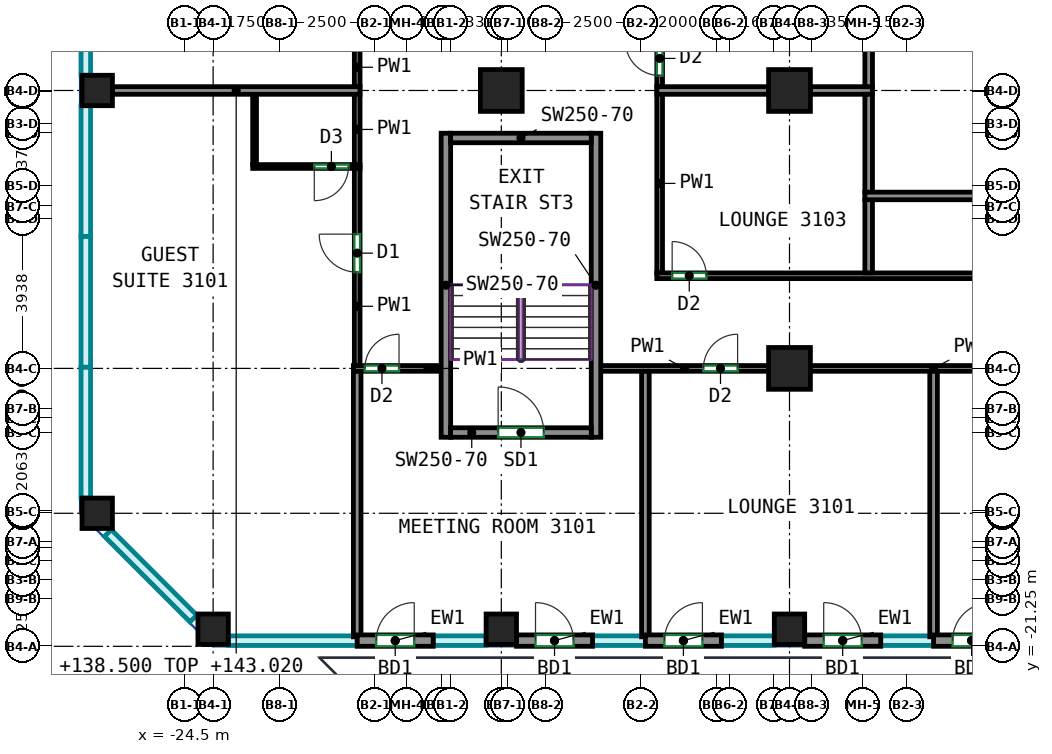
"""IFC4 building model, lengths in metres.
Left out: names, types, materials, properties, quantities, classifications, styles, units other than length and angle.
Written with IfcOpenShell. Run it as: python <this file> out.ifc"""

import sys

from ifc_helpers import new_model, si_unit, direction, frame, frame_2d, origin, origin_2d, place, context, subcontext, project, spatial, rectangle, extrude, source, transform, mapped, element, fill, save


model = new_model("IFC4")
c1 = context("Model", 3, precision=1e-05, world=origin(), true_north=direction((0.0, 1.0)))
c2 = subcontext(c1, "Body", "Model", "MODEL_VIEW")
j1 = project(units=[si_unit("LENGTHUNIT", "METRE"), si_unit("PLANEANGLEUNIT", "RADIAN")], contexts=[c1])
p1 = place(None, origin())
s1 = spatial("IfcSite", under=j1, at=p1, CompositionType="ELEMENT")
p2 = place(p1, origin())
s2 = spatial("IfcBuilding", under=s1, at=p2, CompositionType="ELEMENT")
p3 = place(p2, frame((0.0, 0.0, 138.5)))
s3 = spatial("IfcBuildingStorey", under=s2, at=p3, CompositionType="ELEMENT", Elevation=138.5)
m1 = source(origin(), c2, "Body", "SweptSolid", [
    extrude(rectangle(XDim=0.8, YDim=0.8, at=origin_2d()), origin(), (0.0, 0.0, 1.0), 5.12),
])
for number, where, z_axis, x_axis in (
    (1, (-26.8, -17.75, 0.0), (0.0, 0.0, 1.0), (1.0, 0.0, 0.0)),
    (2, (-26.8, -6.625, 0.0), (0.0, 0.0, 1.0), (1.0, 0.0, 0.0)),
    (3, (-23.75, -20.8, 0.0), (0.0, 0.0, 1.0), (1.0, 0.0, 0.0)),
    (4, (-16.167, -20.8, 0.0), (0.0, 0.0, 1.0), (1.0, 0.0, 0.0)),
):
    element("IfcColumn", number, at=place(p3, frame(where, z_axis=z_axis, x_axis=x_axis)), inside=s3, PredefinedType="COLUMN", context=c2, shape_type="MappedRepresentation", body=[
        mapped(m1, transform((0.0, 0.0, 0.0))),
    ])
m2 = source(origin(), c2, "Body", "SweptSolid", [
    extrude(rectangle(XDim=1.1, YDim=1.1, at=origin_2d()), origin(), (0.0, 0.0, 1.0), 5.12),
])
p4 = place(p3, frame((-16.167, -6.625, 0.0), z_axis=(0.0, 0.0, 1.0), x_axis=(1.0, 0.0, 0.0)))
e5 = element("IfcColumn", 5, at=p4, inside=s3, PredefinedType="COLUMN", context=c2, shape_type="MappedRepresentation", body=[
    mapped(m2, transform((0.0, 0.0, 0.0))),
])
p5 = place(p3, frame((-8.583, -20.8, 0.0), z_axis=(0.0, 0.0, 1.0), x_axis=(1.0, 0.0, 0.0)))
e6 = element("IfcColumn", 6, at=p5, inside=s3, PredefinedType="COLUMN", context=c2, shape_type="MappedRepresentation", body=[
    mapped(m1, transform((0.0, 0.0, 0.0))),
])
for number, where, z_axis, x_axis in (
    (7, (-8.583, -13.938, 0.0), (0.0, 0.0, 1.0), (1.0, 0.0, 0.0)),
    (8, (-8.583, -6.625, 0.0), (0.0, 0.0, 1.0), (1.0, 0.0, 0.0)),
):
    element("IfcColumn", number, at=place(p3, frame(where, z_axis=z_axis, x_axis=x_axis)), inside=s3, PredefinedType="COLUMN", context=c2, shape_type="MappedRepresentation", body=[
        mapped(m2, transform((0.0, 0.0, 0.0))),
    ])
m3 = source(origin(), c2, "Body", "SweptSolid", [
    extrude(rectangle(XDim=8.0, YDim=0.25, at=frame_2d((4.0, 0.0))), origin(), (0.0, 0.0, 1.0), 5.12),
])
for number, where, z_axis, x_axis in (
    (9, (-17.625, -15.75, 0.0), (0.0, 0.0, 1.0), (0.0, 1.0, 0.0)),
    (10, (-13.675, -15.75, 0.0), (0.0, 0.0, 1.0), (0.0, 1.0, 0.0)),
):
    element("IfcWall", number, at=place(p3, frame(where, z_axis=z_axis, x_axis=x_axis)), inside=s3, PredefinedType="SHEAR", context=c2, shape_type="MappedRepresentation", body=[
        mapped(m3, transform((0.0, 0.0, 0.0))),
    ])
m4 = source(origin(), c2, "Body", "SweptSolid", [
    extrude(rectangle(XDim=3.7, YDim=0.25, at=frame_2d((1.85, 0.0))), origin(), (0.0, 0.0, 1.0), 5.12),
])
p6 = place(p3, frame((-17.5, -15.625, 0.0), z_axis=(0.0, 0.0, 1.0), x_axis=(1.0, 0.0, 0.0)))
e11 = element("IfcWall", 11, at=p6, inside=s3, PredefinedType="SHEAR", context=c2, shape_type="MappedRepresentation", body=[
    mapped(m4, transform((0.0, 0.0, 0.0))),
])
p7 = place(p6, frame((1.25, 0.0, 0.0)))
e12 = element("IfcOpeningElement", 12, at=p7, cuts=e11, PredefinedType="OPENING", context=c2, shape_type="SweptSolid", body=[
    extrude(rectangle(XDim=1.2, YDim=2.1, at=frame_2d((0.6, 1.05))), frame((0.0, 0.135, 0.0), z_axis=(0.0, -1.0, 0.0), x_axis=(1.0, 0.0, 0.0)), (0.0, 0.0, 1.0), 0.27),
])
p8 = place(p3, frame((-17.5, -7.875, 0.0), z_axis=(0.0, 0.0, 1.0), x_axis=(1.0, 0.0, 0.0)))
e13 = element("IfcWall", 13, at=p8, inside=s3, PredefinedType="SHEAR", context=c2, shape_type="MappedRepresentation", body=[
    mapped(m4, transform((0.0, 0.0, 0.0))),
])
m5 = source(origin(), c2, "Body", "SweptSolid", [
    extrude(rectangle(XDim=2.0, YDim=0.3, at=frame_2d((1.0, 0.0))), origin(), (0.0, 0.0, 1.0), 5.12),
])
p9 = place(p3, frame((-19.958, -21.1, 0.0), z_axis=(0.0, 0.0, 1.0), x_axis=(1.0, 0.0, 0.0)))
e14 = element("IfcWall", 14, at=p9, inside=s3, PredefinedType="SOLIDWALL", context=c2, shape_type="MappedRepresentation", body=[
    mapped(m5, transform((0.0, 0.0, 0.0))),
])
p10 = place(p9, frame((0.5, 0.0, 0.0)))
e15 = element("IfcOpeningElement", 15, at=p10, cuts=e14, PredefinedType="OPENING", context=c2, shape_type="SweptSolid", body=[
    extrude(rectangle(XDim=1.0, YDim=2.1, at=frame_2d((0.5, 1.05))), frame((0.0, 0.16, 0.0), z_axis=(0.0, -1.0, 0.0), x_axis=(1.0, 0.0, 0.0)), (0.0, 0.0, 1.0), 0.32),
])
p11 = place(p3, frame((-15.767, -21.1, 0.0), z_axis=(0.0, 0.0, 1.0), x_axis=(1.0, 0.0, 0.0)))
e16 = element("IfcWall", 16, at=p11, inside=s3, PredefinedType="SOLIDWALL", context=c2, shape_type="MappedRepresentation", body=[
    mapped(m5, transform((0.0, 0.0, 0.0))),
])
p12 = place(p11, frame((0.5, 0.0, 0.0)))
e17 = element("IfcOpeningElement", 17, at=p12, cuts=e16, PredefinedType="OPENING", context=c2, shape_type="SweptSolid", body=[
    extrude(rectangle(XDim=1.0, YDim=2.1, at=frame_2d((0.5, 1.05))), frame((0.0, 0.16, 0.0), z_axis=(0.0, -1.0, 0.0), x_axis=(1.0, 0.0, 0.0)), (0.0, 0.0, 1.0), 0.32),
])
p13 = place(p3, frame((-12.375, -21.1, 0.0), z_axis=(0.0, 0.0, 1.0), x_axis=(1.0, 0.0, 0.0)))
e18 = element("IfcWall", 18, at=p13, inside=s3, PredefinedType="SOLIDWALL", context=c2, shape_type="MappedRepresentation", body=[
    mapped(m5, transform((0.0, 0.0, 0.0))),
])
p14 = place(p13, frame((0.5, 0.0, 0.0)))
e19 = element("IfcOpeningElement", 19, at=p14, cuts=e18, PredefinedType="OPENING", context=c2, shape_type="SweptSolid", body=[
    extrude(rectangle(XDim=1.0, YDim=2.1, at=frame_2d((0.5, 1.05))), frame((0.0, 0.16, 0.0), z_axis=(0.0, -1.0, 0.0), x_axis=(1.0, 0.0, 0.0)), (0.0, 0.0, 1.0), 0.32),
])
p15 = place(p3, frame((-8.183, -21.1, 0.0), z_axis=(0.0, 0.0, 1.0), x_axis=(1.0, 0.0, 0.0)))
e20 = element("IfcWall", 20, at=p15, inside=s3, PredefinedType="SOLIDWALL", context=c2, shape_type="MappedRepresentation", body=[
    mapped(m5, transform((0.0, 0.0, 0.0))),
])
p16 = place(p15, frame((0.5, 0.0, 0.0)))
e21 = element("IfcOpeningElement", 21, at=p16, cuts=e20, PredefinedType="OPENING", context=c2, shape_type="SweptSolid", body=[
    extrude(rectangle(XDim=1.0, YDim=2.1, at=frame_2d((0.5, 1.05))), frame((0.0, 0.16, 0.0), z_axis=(0.0, -1.0, 0.0), x_axis=(1.0, 0.0, 0.0)), (0.0, 0.0, 1.0), 0.32),
])
p17 = place(p3, frame((-4.792, -21.1, 0.0), z_axis=(0.0, 0.0, 1.0), x_axis=(1.0, 0.0, 0.0)))
e22 = element("IfcWall", 22, at=p17, inside=s3, PredefinedType="SOLIDWALL", context=c2, shape_type="MappedRepresentation", body=[
    mapped(m5, transform((0.0, 0.0, 0.0))),
])
p18 = place(p17, frame((0.5, 0.0, 0.0)))
e23 = element("IfcOpeningElement", 23, at=p18, cuts=e22, PredefinedType="OPENING", context=c2, shape_type="SweptSolid", body=[
    extrude(rectangle(XDim=1.0, YDim=2.1, at=frame_2d((0.5, 1.05))), frame((0.0, 0.16, 0.0), z_axis=(0.0, -1.0, 0.0), x_axis=(1.0, 0.0, 0.0)), (0.0, 0.0, 1.0), 0.32),
])
p19 = place(p3, frame((-13.55, -13.938, 0.0), z_axis=(0.0, 0.0, 1.0), x_axis=(1.0, 0.0, 0.0)))
e24 = element("IfcWall", 24, at=p19, inside=s3, PredefinedType="PARTITIONING", context=c2, shape_type="SweptSolid", body=[
    extrude(rectangle(XDim=4.417, YDim=0.15, at=frame_2d((2.208, 0.0))), origin(), (0.0, 0.0, 1.0), 5.12),
])
p20 = place(p19, frame((2.701, 0.0, 0.0)))
e25 = element("IfcOpeningElement", 25, at=p20, cuts=e24, PredefinedType="OPENING", context=c2, shape_type="SweptSolid", body=[
    extrude(rectangle(XDim=0.9, YDim=2.1, at=frame_2d((0.45, 1.05))), frame((0.0, 0.085, 0.0), z_axis=(0.0, -1.0, 0.0), x_axis=(1.0, 0.0, 0.0)), (0.0, 0.0, 1.0), 0.17),
])
p21 = place(p3, frame((-20.059, -13.938, 0.0), z_axis=(0.0, 0.0, 1.0), x_axis=(1.0, 0.0, 0.0)))
e26 = element("IfcWall", 26, at=p21, inside=s3, PredefinedType="PARTITIONING", context=c2, shape_type="SweptSolid", body=[
    extrude(rectangle(XDim=2.309, YDim=0.15, at=frame_2d((1.155, 0.0))), origin(), (0.0, 0.0, 1.0), 5.12),
])
p22 = place(p21, frame((0.301, 0.0, 0.0)))
e27 = element("IfcOpeningElement", 27, at=p22, cuts=e26, PredefinedType="OPENING", context=c2, shape_type="SweptSolid", body=[
    extrude(rectangle(XDim=0.9, YDim=2.1, at=frame_2d((0.45, 1.05))), frame((0.0, 0.085, 0.0), z_axis=(0.0, -1.0, 0.0), x_axis=(1.0, 0.0, 0.0)), (0.0, 0.0, 1.0), 0.17),
])
p23 = place(p3, frame((-8.033, -13.938, 0.0), z_axis=(0.0, 0.0, 1.0), x_axis=(1.0, 0.0, 0.0)))
e28 = element("IfcWall", 28, at=p23, inside=s3, PredefinedType="PARTITIONING", context=c2, shape_type="SweptSolid", body=[
    extrude(rectangle(XDim=6.483, YDim=0.15, at=frame_2d((3.241, 0.0))), origin(), (0.0, 0.0, 1.0), 5.12),
])
p24 = place(p3, frame((-19.959, -13.863, 0.0), z_axis=(0.0, 0.0, 1.0), x_axis=(0.0, 1.0, 0.0)))
e29 = element("IfcWall", 29, at=p24, inside=s3, PredefinedType="PARTITIONING", context=c2, shape_type="SweptSolid", body=[
    extrude(rectangle(XDim=5.198, YDim=0.15, at=frame_2d((2.599, 0.0))), origin(), (0.0, 0.0, 1.0), 5.12),
])
p25 = place(p24, frame((2.458, 0.0, 0.0)))
e30 = element("IfcOpeningElement", 30, at=p25, cuts=e29, PredefinedType="OPENING", context=c2, shape_type="SweptSolid", body=[
    extrude(rectangle(XDim=1.0, YDim=2.1, at=frame_2d((0.5, 1.05))), frame((0.0, 0.085, 0.0), z_axis=(0.0, -1.0, 0.0), x_axis=(1.0, 0.0, 0.0)), (0.0, 0.0, 1.0), 0.17),
])
p26 = place(p3, frame((-19.959, -8.585, 0.0), z_axis=(0.0, 0.0, 1.0), x_axis=(0.0, 1.0, 0.0)))
e31 = element("IfcWall", 31, at=p26, inside=s3, PredefinedType="PARTITIONING", context=c2, shape_type="SweptSolid", body=[
    extrude(rectangle(XDim=1.87, YDim=0.15, at=frame_2d((0.935, 0.0))), origin(), (0.0, 0.0, 1.0), 5.12),
])
p27 = place(p3, frame((-19.959, -6.535, 0.0), z_axis=(0.0, 0.0, 1.0), x_axis=(0.0, 1.0, 0.0)))
e32 = element("IfcWall", 32, at=p27, inside=s3, PredefinedType="PARTITIONING", context=c2, shape_type="SweptSolid", body=[
    extrude(rectangle(XDim=3.476, YDim=0.15, at=frame_2d((1.738, 0.0))), origin(), (0.0, 0.0, 1.0), 5.12),
])
p28 = place(p27, frame((1.133, 0.0, 0.0)))
e33 = element("IfcOpeningElement", 33, at=p28, cuts=e32, PredefinedType="OPENING", context=c2, shape_type="SweptSolid", body=[
    extrude(rectangle(XDim=0.9, YDim=2.1, at=frame_2d((0.45, 1.05))), frame((0.0, 0.085, 0.0), z_axis=(0.0, -1.0, 0.0), x_axis=(1.0, 0.0, 0.0)), (0.0, 0.0, 1.0), 0.17),
])
p29 = place(p3, frame((-12.0, -11.425, 0.0), z_axis=(0.0, 0.0, 1.0), x_axis=(0.0, 1.0, 0.0)))
e34 = element("IfcWall", 34, at=p29, inside=s3, PredefinedType="PARTITIONING", context=c2, shape_type="SweptSolid", body=[
    extrude(rectangle(XDim=4.71, YDim=0.15, at=frame_2d((2.355, 0.0))), origin(), (0.0, 0.0, 1.0), 5.12),
])
p30 = place(p3, frame((-12.075, -11.5, 0.0), z_axis=(0.0, 0.0, 1.0), x_axis=(1.0, 0.0, 0.0)))
e35 = element("IfcWall", 35, at=p30, inside=s3, PredefinedType="PARTITIONING", context=c2, shape_type="SweptSolid", body=[
    extrude(rectangle(XDim=28.35, YDim=0.15, at=frame_2d((14.175, 0.0))), origin(), (0.0, 0.0, 1.0), 5.12),
])
p31 = place(p30, frame((0.404, 0.0, 0.0)))
e36 = element("IfcOpeningElement", 36, at=p31, cuts=e35, PredefinedType="OPENING", context=c2, shape_type="SweptSolid", body=[
    extrude(rectangle(XDim=0.9, YDim=2.1, at=frame_2d((0.45, 1.05))), frame((0.0, 0.085, 0.0), z_axis=(0.0, -1.0, 0.0), x_axis=(1.0, 0.0, 0.0)), (0.0, 0.0, 1.0), 0.17),
])
p32 = place(p30, frame((13.176, 0.0, 0.0)))
e37 = element("IfcOpeningElement", 37, at=p32, cuts=e35, PredefinedType="OPENING", context=c2, shape_type="SweptSolid", body=[
    extrude(rectangle(XDim=1.0, YDim=2.1, at=frame_2d((0.5, 1.05))), frame((0.0, 0.085, 0.0), z_axis=(0.0, -1.0, 0.0), x_axis=(1.0, 0.0, 0.0)), (0.0, 0.0, 1.0), 0.17),
])
p33 = place(p3, frame((-12.0, -6.535, 0.0), z_axis=(0.0, 0.0, 1.0), x_axis=(0.0, 1.0, 0.0)))
e38 = element("IfcWall", 38, at=p33, inside=s3, PredefinedType="PARTITIONING", context=c2, shape_type="SweptSolid", body=[
    extrude(rectangle(XDim=3.476, YDim=0.15, at=frame_2d((1.738, 0.0))), origin(), (0.0, 0.0, 1.0), 5.12),
])
p34 = place(p33, frame((0.304, 0.0, 0.0)))
e39 = element("IfcOpeningElement", 39, at=p34, cuts=e38, PredefinedType="OPENING", context=c2, shape_type="SweptSolid", body=[
    extrude(rectangle(XDim=0.9, YDim=2.1, at=frame_2d((0.45, 1.05))), frame((0.0, 0.085, 0.0), z_axis=(0.0, -1.0, 0.0), x_axis=(1.0, 0.0, 0.0)), (0.0, 0.0, 1.0), 0.17),
])
for number, where, z_axis, x_axis in (
    (40, (-12.375, -21.0, 0.0), (0.0, 0.0, 1.0), (0.0, 1.0, 0.0)),
    (41, (-19.959, -21.0, 0.0), (0.0, 0.0, 1.0), (0.0, 1.0, 0.0)),
    (42, (-4.792, -21.0, 0.0), (0.0, 0.0, 1.0), (0.0, 1.0, 0.0)),
):
    element("IfcWall", number, at=place(p3, frame(where, z_axis=z_axis, x_axis=x_axis)), inside=s3, PredefinedType="PARTITIONING", context=c2, shape_type="SweptSolid", body=[
        extrude(rectangle(XDim=6.985, YDim=0.2, at=frame_2d((3.493, 0.0))), origin(), (0.0, 0.0, 1.0), 5.12),
    ])
p35 = place(p3, frame((-22.659, -8.575, 0.0), z_axis=(0.0, 0.0, 1.0), x_axis=(0.0, 1.0, 0.0)))
e43 = element("IfcWall", 43, at=p35, inside=s3, PredefinedType="PARTITIONING", context=c2, shape_type="SweptSolid", body=[
    extrude(rectangle(XDim=1.85, YDim=0.1, at=frame_2d((0.925, 0.0))), origin(), (0.0, 0.0, 1.0), 5.12),
])
p36 = place(p3, frame((-19.886, -8.625, 0.0), z_axis=(0.0, 0.0, 1.0), x_axis=(-1.0, 0.0, 0.0)))
e44 = element("IfcWall", 44, at=p36, inside=s3, PredefinedType="PARTITIONING", context=c2, shape_type="SweptSolid", body=[
    extrude(rectangle(XDim=2.823, YDim=0.1, at=frame_2d((1.412, 0.0))), origin(), (0.0, 0.0, 1.0), 5.12),
])
p37 = place(p36, frame((0.302, 0.0, 0.0)))
e45 = element("IfcOpeningElement", 45, at=p37, cuts=e44, PredefinedType="OPENING", context=c2, shape_type="SweptSolid", body=[
    extrude(rectangle(XDim=0.9, YDim=2.1, at=frame_2d((0.45, 1.05))), frame((0.0, 0.06, 0.0), z_axis=(0.0, -1.0, 0.0), x_axis=(1.0, 0.0, 0.0)), (0.0, 0.0, 1.0), 0.12),
])
p38 = place(p3, frame((-26.4, -6.625, 0.0), z_axis=(0.0, 0.0, 1.0), x_axis=(1.0, 0.0, 0.0)))
e46 = element("IfcWall", 46, at=p38, inside=s3, PredefinedType="PARTITIONING", context=c2, shape_type="SweptSolid", body=[
    extrude(rectangle(XDim=6.514, YDim=0.2, at=frame_2d((3.257, 0.0))), origin(), (0.0, 0.0, 1.0), 4.52),
])
p39 = place(p3, frame((-12.073, -6.625, 0.0), z_axis=(0.0, 0.0, 1.0), x_axis=(1.0, 0.0, 0.0)))
e47 = element("IfcWall", 47, at=p39, inside=s3, PredefinedType="PARTITIONING", context=c2, shape_type="SweptSolid", body=[
    extrude(rectangle(XDim=2.94, YDim=0.2, at=frame_2d((1.47, 0.0))), origin(), (0.0, 0.0, 1.0), 5.12),
])
p40 = place(p3, frame((-8.033, -6.625, 0.0), z_axis=(0.0, 0.0, 1.0), x_axis=(1.0, 0.0, 0.0)))
e48 = element("IfcWall", 48, at=p40, inside=s3, PredefinedType="PARTITIONING", context=c2, shape_type="SweptSolid", body=[
    extrude(rectangle(XDim=1.633, YDim=0.2, at=frame_2d((0.816, 0.0))), origin(), (0.0, 0.0, 1.0), 5.12),
])
p41 = place(p3, frame((-6.5, -11.423, 0.0), z_axis=(0.0, 0.0, 1.0), x_axis=(0.0, 1.0, 0.0)))
e49 = element("IfcWall", 49, at=p41, inside=s3, PredefinedType="PARTITIONING", context=c2, shape_type="SweptSolid", body=[
    extrude(rectangle(XDim=1.933, YDim=0.2, at=frame_2d((0.967, 0.0))), origin(), (0.0, 0.0, 1.0), 5.12),
])
p42 = place(p3, frame((-6.5, -9.31, 0.0), z_axis=(0.0, 0.0, 1.0), x_axis=(0.0, 1.0, 0.0)))
e50 = element("IfcWall", 50, at=p42, inside=s3, PredefinedType="PARTITIONING", context=c2, shape_type="SweptSolid", body=[
    extrude(rectangle(XDim=2.585, YDim=0.2, at=frame_2d((1.292, 0.0))), origin(), (0.0, 0.0, 1.0), 5.12),
])
p43 = place(p3, frame((-6.5, -6.525, 0.0), z_axis=(0.0, 0.0, 1.0), x_axis=(0.0, 1.0, 0.0)))
e51 = element("IfcWall", 51, at=p43, inside=s3, PredefinedType="PARTITIONING", context=c2, shape_type="SweptSolid", body=[
    extrude(rectangle(XDim=3.456, YDim=0.2, at=frame_2d((1.728, 0.0))), origin(), (0.0, 0.0, 1.0), 5.12),
])
p44 = place(p3, frame((8.6, -9.4, 0.0), z_axis=(0.0, 0.0, 1.0), x_axis=(-1.0, 0.0, 0.0)))
e52 = element("IfcWall", 52, at=p44, inside=s3, PredefinedType="PARTITIONING", context=c2, shape_type="SweptSolid", body=[
    extrude(rectangle(XDim=15.2, YDim=0.2, at=frame_2d((7.6, 0.0))), origin(), (0.0, 0.0, 1.0), 5.12),
])
p45 = place(p10, origin())
e53 = element("IfcDoor", 53, at=p45, inside=s3, OperationType="SINGLE_SWING_RIGHT", PredefinedType="DOOR", context=c2, shape_type="SweptSolid", body=[
    extrude(rectangle(XDim=1.0, YDim=2.1, at=frame_2d((0.5, 1.05))), frame((0.0, 0.025, 0.0), z_axis=(0.0, -1.0, 0.0), x_axis=(1.0, 0.0, 0.0)), (0.0, 0.0, 1.0), 0.05),
])
fill(e15, e53)
p46 = place(p12, origin())
e54 = element("IfcDoor", 54, at=p46, inside=s3, OperationType="SINGLE_SWING_LEFT", PredefinedType="DOOR", context=c2, shape_type="SweptSolid", body=[
    extrude(rectangle(XDim=1.0, YDim=2.1, at=frame_2d((0.5, 1.05))), frame((0.0, 0.025, 0.0), z_axis=(0.0, -1.0, 0.0), x_axis=(1.0, 0.0, 0.0)), (0.0, 0.0, 1.0), 0.05),
])
fill(e17, e54)
p47 = place(p14, origin())
e55 = element("IfcDoor", 55, at=p47, inside=s3, OperationType="SINGLE_SWING_RIGHT", PredefinedType="DOOR", context=c2, shape_type="SweptSolid", body=[
    extrude(rectangle(XDim=1.0, YDim=2.1, at=frame_2d((0.5, 1.05))), frame((0.0, 0.025, 0.0), z_axis=(0.0, -1.0, 0.0), x_axis=(1.0, 0.0, 0.0)), (0.0, 0.0, 1.0), 0.05),
])
fill(e19, e55)
p48 = place(p16, origin())
e56 = element("IfcDoor", 56, at=p48, inside=s3, OperationType="SINGLE_SWING_LEFT", PredefinedType="DOOR", context=c2, shape_type="SweptSolid", body=[
    extrude(rectangle(XDim=1.0, YDim=2.1, at=frame_2d((0.5, 1.05))), frame((0.0, 0.025, 0.0), z_axis=(0.0, -1.0, 0.0), x_axis=(1.0, 0.0, 0.0)), (0.0, 0.0, 1.0), 0.05),
])
fill(e21, e56)
p49 = place(p18, origin())
e57 = element("IfcDoor", 57, at=p49, inside=s3, OperationType="SINGLE_SWING_RIGHT", PredefinedType="DOOR", context=c2, shape_type="SweptSolid", body=[
    extrude(rectangle(XDim=1.0, YDim=2.1, at=frame_2d((0.5, 1.05))), frame((0.0, 0.025, 0.0), z_axis=(0.0, -1.0, 0.0), x_axis=(1.0, 0.0, 0.0)), (0.0, 0.0, 1.0), 0.05),
])
fill(e23, e57)
p50 = place(p7, origin())
e58 = element("IfcDoor", 58, at=p50, inside=s3, OperationType="DOUBLE_DOOR_SINGLE_SWING", PredefinedType="DOOR", context=c2, shape_type="SweptSolid", body=[
    extrude(rectangle(XDim=1.2, YDim=2.1, at=frame_2d((0.6, 1.05))), frame((0.0, 0.025, 0.0), z_axis=(0.0, -1.0, 0.0), x_axis=(1.0, 0.0, 0.0)), (0.0, 0.0, 1.0), 0.05),
])
fill(e12, e58)
p51 = place(p22, origin())
e59 = element("IfcDoor", 59, at=p51, inside=s3, OperationType="SINGLE_SWING_RIGHT", PredefinedType="DOOR", context=c2, shape_type="SweptSolid", body=[
    extrude(rectangle(XDim=0.9, YDim=2.1, at=frame_2d((0.45, 1.05))), frame((0.0, 0.025, 0.0), z_axis=(0.0, -1.0, 0.0), x_axis=(1.0, 0.0, 0.0)), (0.0, 0.0, 1.0), 0.05),
])
fill(e27, e59)
p52 = place(p20, origin())
e60 = element("IfcDoor", 60, at=p52, inside=s3, OperationType="SINGLE_SWING_RIGHT", PredefinedType="DOOR", context=c2, shape_type="SweptSolid", body=[
    extrude(rectangle(XDim=0.9, YDim=2.1, at=frame_2d((0.45, 1.05))), frame((0.0, 0.025, 0.0), z_axis=(0.0, -1.0, 0.0), x_axis=(1.0, 0.0, 0.0)), (0.0, 0.0, 1.0), 0.05),
])
fill(e25, e60)
p53 = place(p31, origin())
e61 = element("IfcDoor", 61, at=p53, inside=s3, OperationType="SINGLE_SWING_LEFT", PredefinedType="DOOR", context=c2, shape_type="SweptSolid", body=[
    extrude(rectangle(XDim=0.9, YDim=2.1, at=frame_2d((0.45, 1.05))), frame((0.0, 0.025, 0.0), z_axis=(0.0, -1.0, 0.0), x_axis=(1.0, 0.0, 0.0)), (0.0, 0.0, 1.0), 0.05),
])
fill(e36, e61)
p54 = place(p25, origin())
e62 = element("IfcDoor", 62, at=p54, inside=s3, OperationType="SINGLE_SWING_RIGHT", PredefinedType="DOOR", context=c2, shape_type="SweptSolid", body=[
    extrude(rectangle(XDim=1.0, YDim=2.1, at=frame_2d((0.5, 1.05))), frame((0.0, 0.025, 0.0), z_axis=(0.0, -1.0, 0.0), x_axis=(1.0, 0.0, 0.0)), (0.0, 0.0, 1.0), 0.05),
])
fill(e30, e62)
p55 = place(p37, origin())
e63 = element("IfcDoor", 63, at=p55, inside=s3, OperationType="SINGLE_SWING_RIGHT", PredefinedType="DOOR", context=c2, shape_type="SweptSolid", body=[
    extrude(rectangle(XDim=0.9, YDim=2.1, at=frame_2d((0.45, 1.05))), frame((0.0, 0.025, 0.0), z_axis=(0.0, -1.0, 0.0), x_axis=(1.0, 0.0, 0.0)), (0.0, 0.0, 1.0), 0.05),
])
fill(e45, e63)
p56 = place(p34, origin())
e64 = element("IfcDoor", 64, at=p56, inside=s3, OperationType="SINGLE_SWING_RIGHT", PredefinedType="DOOR", context=c2, shape_type="SweptSolid", body=[
    extrude(rectangle(XDim=0.9, YDim=2.1, at=frame_2d((0.45, 1.05))), frame((0.0, 0.025, 0.0), z_axis=(0.0, -1.0, 0.0), x_axis=(1.0, 0.0, 0.0)), (0.0, 0.0, 1.0), 0.05),
])
fill(e39, e64)
save(model, sys.argv[1])
